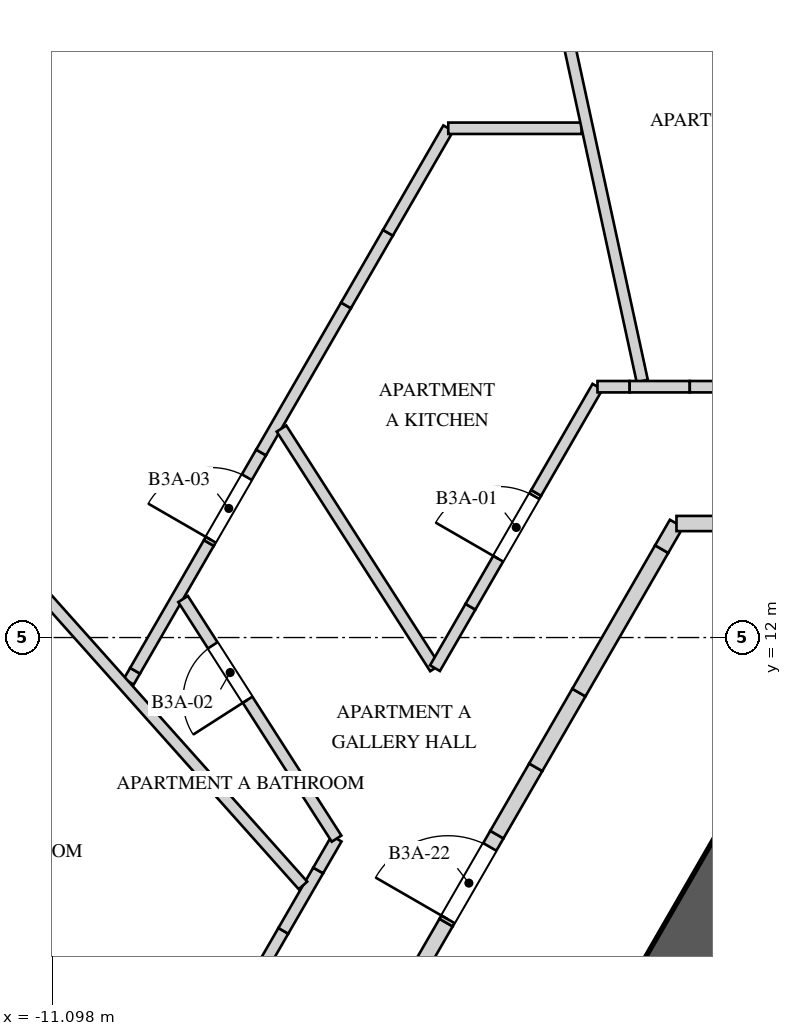
"""IFC4 building model, lengths in metres.
Left out: names, types, materials, properties, quantities, classifications, styles, units other than length and angle.
Written with IfcOpenShell. Run it as: python <this file> out.ifc"""

import sys

from ifc_helpers import new_model, si_unit, direction, frame, frame_2d, origin, place, context, subcontext, project, spatial, polyline, rectangle, outline, extrude, element, fill, save


model = new_model("IFC4")
c1 = context("Model", 3, precision=1e-05, world=origin(), true_north=direction((0.0, 1.0)))
c2 = subcontext(c1, "Body", "Model", "MODEL_VIEW")
j1 = project(units=[si_unit("LENGTHUNIT", "METRE"), si_unit("PLANEANGLEUNIT", "RADIAN")], contexts=[c1])
p1 = place(None, origin())
s1 = spatial("IfcSite", under=j1, at=p1, CompositionType="ELEMENT")
p2 = place(p1, origin())
s2 = spatial("IfcBuilding", under=s1, at=p2, CompositionType="ELEMENT")
p3 = place(p2, frame((0.0, 0.0, 133.6)))
s3 = spatial("IfcBuildingStorey", under=s2, at=p3, CompositionType="ELEMENT", Elevation=133.6)
p4 = place(p3, frame((-1.184, 10.55, 0.0), z_axis=(0.0, 0.0, 1.0), x_axis=(-0.500004814304, -0.866022624227, 0.0)))
e1 = element("IfcWall", 1, at=p4, inside=s3, PredefinedType="SHEAR", context=c2, shape_type="SweptSolid", body=[
    extrude(rectangle(XDim=17.09, YDim=0.9, at=frame_2d((8.545, 0.0))), origin(), (0.0, 0.0, 1.0), 4.0),
])
p5 = place(p4, frame((6.75, 0.0, 0.0)))
e2 = element("IfcOpeningElement", 2, at=p5, cuts=e1, PredefinedType="OPENING", context=c2, shape_type="SweptSolid", body=[
    extrude(rectangle(XDim=1.0, YDim=2.4, at=frame_2d((0.5, 1.2))), frame((0.0, 0.46, 0.0), z_axis=(0.0, -1.0, 0.0), x_axis=(1.0, 0.0, 0.0)), (0.0, 0.0, 1.0), 0.92),
])
p6 = place(p4, frame((14.678, 0.0, 0.0)))
e3 = element("IfcOpeningElement", 3, at=p6, cuts=e1, PredefinedType="OPENING", context=c2, shape_type="SweptSolid", body=[
    extrude(rectangle(XDim=0.8, YDim=2.1, at=frame_2d((0.4, 1.05))), frame((0.0, 0.46, 0.0), z_axis=(0.0, -1.0, 0.0), x_axis=(1.0, 0.0, 0.0)), (0.0, 0.0, 1.0), 0.92),
])
p7 = place(p3, frame((1.597, 19.024, 0.0), z_axis=(0.0, 0.0, 1.0), x_axis=(-0.838677021821, 0.54462909679, 0.0)))
e4 = element("IfcWall", 4, at=p7, inside=s3, PredefinedType="SOLIDWALL", context=c2, shape_type="SweptSolid", body=[
    extrude(rectangle(XDim=7.072, YDim=0.45, at=frame_2d((3.536, 0.0))), origin(), (0.0, 0.0, 1.0), 3.3),
])
p8 = place(p7, frame((0.195, 0.0, 0.5)))
e5 = element("IfcOpeningElement", 5, at=p8, cuts=e4, PredefinedType="OPENING", context=c2, shape_type="SweptSolid", body=[
    extrude(rectangle(XDim=1.75, YDim=2.65, at=frame_2d((0.875, 1.325))), frame((0.0, 0.235, 0.0), z_axis=(0.0, -1.0, 0.0), x_axis=(1.0, 0.0, 0.0)), (0.0, 0.0, 1.0), 0.47),
])
p9 = place(p7, frame((2.661, 0.0, 0.5)))
e6 = element("IfcOpeningElement", 6, at=p9, cuts=e4, PredefinedType="OPENING", context=c2, shape_type="SweptSolid", body=[
    extrude(rectangle(XDim=1.75, YDim=2.65, at=frame_2d((0.875, 1.325))), frame((0.0, 0.235, 0.0), z_axis=(0.0, -1.0, 0.0), x_axis=(1.0, 0.0, 0.0)), (0.0, 0.0, 1.0), 0.47),
])
p10 = place(p7, frame((5.126, 0.0, 0.5)))
e7 = element("IfcOpeningElement", 7, at=p10, cuts=e4, PredefinedType="OPENING", context=c2, shape_type="SweptSolid", body=[
    extrude(rectangle(XDim=1.75, YDim=2.0, at=frame_2d((0.875, 1.0))), frame((0.0, 0.235, 0.0), z_axis=(0.0, -1.0, 0.0), x_axis=(1.0, 0.0, 0.0)), (0.0, 0.0, 1.0), 0.47),
])
p11 = place(p3, frame((-0.766, 9.772, 0.0), z_axis=(0.0, 0.0, 1.0), x_axis=(-0.500009909098, -0.866019682689, 0.0)))
e8 = element("IfcWall", 8, at=p11, inside=s3, PredefinedType="SOLIDWALL", context=c2, shape_type="SweptSolid", body=[
    extrude(rectangle(XDim=6.2, YDim=0.4, at=frame_2d((3.1, 0.0))), origin(), (0.0, 0.0, 1.0), 3.65),
])
p12 = place(p3, frame((-9.458, 5.719, 0.0), z_axis=(0.0, 0.0, 1.0), x_axis=(0.499996941814, 0.866027169422, 0.0)))
e9 = element("IfcWall", 9, at=p12, inside=s3, PredefinedType="PARTITIONING", context=c2, shape_type="SweptSolid", body=[
    extrude(rectangle(XDim=2.797, YDim=0.15, at=frame_2d((1.399, 0.0))), origin(), (0.0, 0.0, 1.0), 3.65),
])
p13 = place(p12, frame((1.1, 0.0, 0.0)))
e10 = element("IfcOpeningElement", 10, at=p13, cuts=e9, PredefinedType="OPENING", context=c2, shape_type="SweptSolid", body=[
    extrude(rectangle(XDim=0.95, YDim=2.4, at=frame_2d((0.475, 1.2))), frame((0.0, 0.085, 0.0), z_axis=(0.0, -1.0, 0.0), x_axis=(1.0, 0.0, 0.0)), (0.0, 0.0, 1.0), 0.17),
])
p14 = place(p3, frame((-8.059, 8.141, 0.0), z_axis=(0.0, 0.0, 1.0), x_axis=(0.500060322201, 0.865990573944, 0.0)))
e11 = element("IfcWall", 11, at=p14, inside=s3, PredefinedType="PARTITIONING", context=c2, shape_type="SweptSolid", body=[
    extrude(rectangle(XDim=0.917, YDim=0.15, at=frame_2d((0.459, 0.0))), origin(), (0.0, 0.0, 1.0), 2.55),
])
p15 = place(p3, frame((-7.6, 8.936, 0.0), z_axis=(0.0, 0.0, 1.0), x_axis=(0.499941024108, 0.866059450854, 0.0)))
e12 = element("IfcWall", 12, at=p15, inside=s3, PredefinedType="PARTITIONING", context=c2, shape_type="SweptSolid", body=[
    extrude(rectangle(XDim=0.483, YDim=0.15, at=frame_2d((0.242, 0.0))), origin(), (0.0, 0.0, 1.0), 3.65),
])
p16 = place(p3, frame((-10.093, 11.419, 0.0), z_axis=(0.0, 0.0, 1.0), x_axis=(0.500399834964, 0.865794435861, 0.0)))
e13 = element("IfcWall", 13, at=p16, inside=s3, PredefinedType="PARTITIONING", context=c2, shape_type="SweptSolid", body=[
    extrude(rectangle(XDim=0.166, YDim=0.15, at=frame_2d((0.083, 0.0))), origin(), (0.0, 0.0, 1.0), 2.55),
])
p17 = place(p3, frame((-10.01, 11.563, 0.0), z_axis=(0.0, 0.0, 1.0), x_axis=(0.499994660107, 0.866028486751, 0.0)))
e14 = element("IfcWall", 14, at=p17, inside=s3, PredefinedType="PARTITIONING", context=c2, shape_type="SweptSolid", body=[
    extrude(rectangle(XDim=1.941, YDim=0.15, at=frame_2d((0.97, 0.0))), origin(), (0.0, 0.0, 1.0), 3.65),
])
p18 = place(p3, frame((-9.039, 13.244, 0.0), z_axis=(0.0, 0.0, 1.0), x_axis=(0.499978698016, 0.866037702141, 0.0)))
e15 = element("IfcWall", 15, at=p18, inside=s3, PredefinedType="PARTITIONING", context=c2, shape_type="SweptSolid", body=[
    extrude(outline(polyline([(0.0, 0.0), (1.375, 0.0), (1.375, 2.55), (0.38, 2.55), (0.38, 3.65), (0.0, 3.65), (0.0, 0.0)])), frame((0.0, 0.075, 0.0), z_axis=(0.0, -1.0, 0.0), x_axis=(1.0, 0.0, 0.0)), (0.0, 0.0, 1.0), 0.15),
])
p19 = place(p18, frame((0.05, 0.0, 0.0)))
e16 = element("IfcOpeningElement", 16, at=p19, cuts=e15, PredefinedType="OPENING", context=c2, shape_type="SweptSolid", body=[
    extrude(rectangle(XDim=0.95, YDim=2.4, at=frame_2d((0.475, 1.2))), frame((0.0, 0.085, 0.0), z_axis=(0.0, -1.0, 0.0), x_axis=(1.0, 0.0, 0.0)), (0.0, 0.0, 1.0), 0.17),
])
p20 = place(p3, frame((-8.352, 14.434, 0.0), z_axis=(0.0, 0.0, 1.0), x_axis=(0.500040905051, 0.866001785954, 0.0)))
e17 = element("IfcWall", 17, at=p20, inside=s3, PredefinedType="PARTITIONING", context=c2, shape_type="SweptSolid", body=[
    extrude(rectangle(XDim=2.234, YDim=0.15, at=frame_2d((1.117, 0.0))), origin(), (0.0, 0.0, 1.0), 3.65),
])
p21 = place(p3, frame((-7.235, 16.369, 0.0), z_axis=(0.0, 0.0, 1.0), x_axis=(0.499850094852, 0.866111934265, 0.0)))
e18 = element("IfcWall", 18, at=p21, inside=s3, PredefinedType="PARTITIONING", context=c2, shape_type="SweptSolid", body=[
    extrude(rectangle(XDim=1.104, YDim=0.15, at=frame_2d((0.552, 0.0))), origin(), (0.0, 0.0, 1.0), 2.55),
])
p22 = place(p3, frame((-6.683, 17.325, 0.0), z_axis=(0.0, 0.0, 1.0), x_axis=(0.500108487576, 0.865962759392, 0.0)))
e19 = element("IfcWall", 19, at=p22, inside=s3, PredefinedType="PARTITIONING", context=c2, shape_type="SweptSolid", body=[
    extrude(rectangle(XDim=1.588, YDim=0.15, at=frame_2d((0.794, 0.0))), origin(), (0.0, 0.0, 1.0), 3.65),
])
p23 = place(p3, frame((-9.658, 5.522, 0.0), z_axis=(0.0, 0.0, 1.0), x_axis=(-0.868078092768, 0.496427663267, 0.0)))
e20 = element("IfcWall", 20, at=p23, inside=s3, PredefinedType="PARTITIONING", context=c2, shape_type="SweptSolid", body=[
    extrude(rectangle(XDim=7.467, YDim=0.15, at=frame_2d((3.733, 0.0))), origin(), (0.0, 0.0, 1.0), 2.75),
])
p24 = place(p3, frame((-8.083, 14.749, 0.0), z_axis=(0.0, 0.0, 1.0), x_axis=(0.539468172068, -0.842005992452, 0.0)))
e21 = element("IfcWall", 21, at=p24, inside=s3, PredefinedType="PARTITIONING", context=c2, shape_type="SweptSolid", body=[
    extrude(rectangle(XDim=3.744, YDim=0.15, at=frame_2d((1.872, 0.0))), origin(), (0.0, 0.0, 1.0), 3.65),
])
p25 = place(p3, frame((-7.801, 8.739, 0.0), z_axis=(0.0, 0.0, 1.0), x_axis=(-0.665934790779, 0.746009955986, 0.0)))
e22 = element("IfcWall", 22, at=p25, inside=s3, PredefinedType="PARTITIONING", context=c2, shape_type="SweptSolid", body=[
    extrude(rectangle(XDim=11.863, YDim=0.15, at=frame_2d((5.932, 0.0))), origin(), (0.0, 0.0, 1.0), 2.55),
])
p26 = place(p3, frame((-7.359, 9.354, 0.0), z_axis=(0.0, 0.0, 1.0), x_axis=(-0.539468172068, 0.842005992452, 0.0)))
e23 = element("IfcWall", 23, at=p26, inside=s3, PredefinedType="PARTITIONING", context=c2, shape_type="SweptSolid", body=[
    extrude(rectangle(XDim=3.744, YDim=0.15, at=frame_2d((1.872, 0.0))), origin(), (0.0, 0.0, 1.0), 3.65),
])
p27 = place(p26, frame((2.17, 0.0, 0.0)))
e24 = element("IfcOpeningElement", 24, at=p27, cuts=e23, PredefinedType="OPENING", context=c2, shape_type="SweptSolid", body=[
    extrude(rectangle(XDim=0.85, YDim=2.4, at=frame_2d((0.425, 1.2))), frame((0.0, 0.085, 0.0), z_axis=(0.0, -1.0, 0.0), x_axis=(1.0, 0.0, 0.0)), (0.0, 0.0, 1.0), 0.17),
])
p28 = place(p3, frame((-6.064, 11.597, 0.0), z_axis=(0.0, 0.0, 1.0), x_axis=(0.499797962495, 0.866142018774, 0.0)))
e25 = element("IfcWall", 25, at=p28, inside=s3, PredefinedType="PARTITIONING", context=c2, shape_type="SweptSolid", body=[
    extrude(rectangle(XDim=0.933, YDim=0.15, at=frame_2d((0.467, 0.0))), origin(), (0.0, 0.0, 1.0), 3.65),
])
p29 = place(p3, frame((-5.597, 12.405, 0.0), z_axis=(0.0, 0.0, 1.0), x_axis=(0.500040090343, 0.866002256377, 0.0)))
e26 = element("IfcWall", 26, at=p29, inside=s3, PredefinedType="PARTITIONING", context=c2, shape_type="SweptSolid", body=[
    extrude(outline(polyline([(0.0, 0.0), (1.73, 0.0), (1.73, 3.65), (1.104, 3.65), (1.104, 2.55), (0.0, 2.55), (0.0, 0.0)])), frame((0.0, 0.075, 0.0), z_axis=(0.0, -1.0, 0.0), x_axis=(1.0, 0.0, 0.0)), (0.0, 0.0, 1.0), 0.15),
])
p30 = place(p29, frame((0.73, 0.0, 0.0)))
e27 = element("IfcOpeningElement", 27, at=p30, cuts=e26, PredefinedType="OPENING", context=c2, shape_type="SweptSolid", body=[
    extrude(rectangle(XDim=0.95, YDim=2.4, at=frame_2d((0.475, 1.2))), frame((0.0, 0.085, 0.0), z_axis=(0.0, -1.0, 0.0), x_axis=(1.0, 0.0, 0.0)), (0.0, 0.0, 1.0), 0.17),
])
p31 = place(p3, frame((-4.732, 13.903, 0.0), z_axis=(0.0, 0.0, 1.0), x_axis=(0.499997628298, 0.866026773083, 0.0)))
e28 = element("IfcWall", 28, at=p31, inside=s3, PredefinedType="PARTITIONING", context=c2, shape_type="SweptSolid", body=[
    extrude(rectangle(XDim=1.613, YDim=0.15, at=frame_2d((0.806, 0.0))), origin(), (0.0, 0.0, 1.0), 3.65),
])
p32 = place(p3, frame((-5.889, 18.7, 0.0), z_axis=(0.0, 0.0, 1.0), x_axis=(1.0, 0.0, 0.0)))
e29 = element("IfcWall", 29, at=p32, inside=s3, PredefinedType="PARTITIONING", context=c2, shape_type="SweptSolid", body=[
    extrude(rectangle(XDim=1.753, YDim=0.15, at=frame_2d((0.877, 0.0))), origin(), (0.0, 0.0, 1.0), 3.65),
])
p33 = place(p3, frame((-5.001, 23.041, 0.0), z_axis=(0.0, 0.0, 1.0), x_axis=(0.212100148987, -0.977247935173, 0.0)))
e30 = element("IfcWall", 30, at=p33, inside=s3, PredefinedType="PARTITIONING", context=c2, shape_type="SweptSolid", body=[
    extrude(rectangle(XDim=7.844, YDim=0.15, at=frame_2d((3.922, 0.0))), origin(), (0.0, 0.0, 1.0), 2.75),
])
p34 = place(p3, frame((-3.926, 15.3, 0.0), z_axis=(0.0, 0.0, 1.0), x_axis=(1.0, 0.0, 0.0)))
e31 = element("IfcWall", 31, at=p34, inside=s3, PredefinedType="PARTITIONING", context=c2, shape_type="SweptSolid", body=[
    extrude(rectangle(XDim=0.423, YDim=0.15, at=frame_2d((0.212, 0.0))), origin(), (0.0, 0.0, 1.0), 3.65),
])
p35 = place(p3, frame((-3.503, 15.3, 0.0), z_axis=(0.0, 0.0, 1.0), x_axis=(1.0, 0.0, 0.0)))
e32 = element("IfcWall", 32, at=p35, inside=s3, PredefinedType="PARTITIONING", context=c2, shape_type="SweptSolid", body=[
    extrude(rectangle(XDim=0.791, YDim=0.15, at=frame_2d((0.396, 0.0))), origin(), (0.0, 0.0, 1.0), 2.75),
])
p36 = place(p3, frame((-2.712, 15.3, 0.0), z_axis=(0.0, 0.0, 1.0), x_axis=(1.0, 0.0, 0.0)))
e33 = element("IfcWall", 33, at=p36, inside=s3, PredefinedType="PARTITIONING", context=c2, shape_type="SweptSolid", body=[
    extrude(rectangle(XDim=4.209, YDim=0.15, at=frame_2d((2.105, 0.0))), origin(), (0.0, 0.0, 1.0), 3.65),
])
p37 = place(p36, frame((2.518, 0.0, 0.0)))
e34 = element("IfcOpeningElement", 34, at=p37, cuts=e33, PredefinedType="OPENING", context=c2, shape_type="SweptSolid", body=[
    extrude(rectangle(XDim=0.95, YDim=2.4, at=frame_2d((0.475, 1.2))), frame((0.0, 0.085, 0.0), z_axis=(0.0, -1.0, 0.0), x_axis=(1.0, 0.0, 0.0)), (0.0, 0.0, 1.0), 0.17),
])
p38 = place(p3, frame((-6.318, 7.556, 0.0), z_axis=(0.0, 0.0, 1.0), x_axis=(0.499942357345, 0.866058681229, 0.0)))
e35 = element("IfcWall", 35, at=p38, inside=s3, PredefinedType="SOLIDWALL", context=c2, shape_type="SweptSolid", body=[
    extrude(rectangle(XDim=0.801, YDim=0.2, at=frame_2d((0.4, 0.0))), origin(), (0.0, 0.0, 1.0), 3.65),
])
p39 = place(p3, frame((-5.918, 8.25, 0.0), z_axis=(0.0, 0.0, 1.0), x_axis=(0.500028081597, 0.86600919026, 0.0)))
e36 = element("IfcWall", 36, at=p39, inside=s3, PredefinedType="SOLIDWALL", context=c2, shape_type="SweptSolid", body=[
    extrude(outline(polyline([(0.0, 0.0), (1.337, 0.0), (1.337, 2.55), (0.313, 2.55), (0.313, 3.65), (0.0, 3.65), (0.0, 0.0)])), frame((0.0, 0.1, 0.0), z_axis=(0.0, -1.0, 0.0), x_axis=(1.0, 0.0, 0.0)), (0.0, 0.0, 1.0), 0.2),
])
p40 = place(p39, frame((0.05, 0.0, 0.0)))
e37 = element("IfcOpeningElement", 37, at=p40, cuts=e36, PredefinedType="OPENING", context=c2, shape_type="SweptSolid", body=[
    extrude(rectangle(XDim=1.1, YDim=2.4, at=frame_2d((0.55, 1.2))), frame((0.0, 0.11, 0.0), z_axis=(0.0, -1.0, 0.0), x_axis=(1.0, 0.0, 0.0)), (0.0, 0.0, 1.0), 0.22),
])
p41 = place(p3, frame((-5.25, 9.407, 0.0), z_axis=(0.0, 0.0, 1.0), x_axis=(0.499991148707, 0.866030514021, 0.0)))
e38 = element("IfcWall", 38, at=p41, inside=s3, PredefinedType="SOLIDWALL", context=c2, shape_type="SweptSolid", body=[
    extrude(rectangle(XDim=1.022, YDim=0.2, at=frame_2d((0.511, 0.0))), origin(), (0.0, 0.0, 1.0), 3.65),
])
p42 = place(p3, frame((-4.738, 10.293, 0.0), z_axis=(0.0, 0.0, 1.0), x_axis=(0.500001688065, 0.866024429177, 0.0)))
e39 = element("IfcWall", 39, at=p42, inside=s3, PredefinedType="SOLIDWALL", context=c2, shape_type="SweptSolid", body=[
    extrude(rectangle(XDim=1.135, YDim=0.2, at=frame_2d((0.568, 0.0))), origin(), (0.0, 0.0, 1.0), 2.55),
])
p43 = place(p3, frame((-4.171, 11.276, 0.0), z_axis=(0.0, 0.0, 1.0), x_axis=(0.50001992892, 0.866013897511, 0.0)))
e40 = element("IfcWall", 40, at=p43, inside=s3, PredefinedType="SOLIDWALL", context=c2, shape_type="SweptSolid", body=[
    extrude(rectangle(XDim=2.179, YDim=0.2, at=frame_2d((1.089, 0.0))), origin(), (0.0, 0.0, 1.0), 3.65),
])
p44 = place(p3, frame((-3.081, 13.163, 0.0), z_axis=(0.0, 0.0, 1.0), x_axis=(0.499849133735, 0.866112488944, 0.0)))
e41 = element("IfcWall", 41, at=p44, inside=s3, PredefinedType="SOLIDWALL", context=c2, shape_type="SweptSolid", body=[
    extrude(rectangle(XDim=0.389, YDim=0.2, at=frame_2d((0.195, 0.0))), origin(), (0.0, 0.0, 1.0), 2.75),
])
p45 = place(p3, frame((-2.887, 13.5, 0.0), z_axis=(0.0, 0.0, 1.0), x_axis=(1.0, 0.0, 0.0)))
e42 = element("IfcWall", 42, at=p45, inside=s3, PredefinedType="SOLIDWALL", context=c2, shape_type="SweptSolid", body=[
    extrude(rectangle(XDim=0.553, YDim=0.2, at=frame_2d((0.277, 0.0))), origin(), (0.0, 0.0, 1.0), 2.75),
])
p46 = place(p30, origin())
e43 = element("IfcDoor", 43, at=p46, inside=s3, OperationType="SINGLE_SWING_LEFT", PredefinedType="DOOR", context=c2, shape_type="SweptSolid", body=[
    extrude(rectangle(XDim=0.95, YDim=2.4, at=frame_2d((0.475, 1.2))), frame((0.0, 0.025, 0.0), z_axis=(0.0, -1.0, 0.0), x_axis=(1.0, 0.0, 0.0)), (0.0, 0.0, 1.0), 0.05),
])
fill(e27, e43)
p47 = place(p27, origin())
e44 = element("IfcDoor", 44, at=p47, inside=s3, OperationType="SINGLE_SWING_RIGHT", PredefinedType="DOOR", context=c2, shape_type="SweptSolid", body=[
    extrude(rectangle(XDim=0.85, YDim=2.4, at=frame_2d((0.425, 1.2))), frame((0.0, 0.025, 0.0), z_axis=(0.0, -1.0, 0.0), x_axis=(1.0, 0.0, 0.0)), (0.0, 0.0, 1.0), 0.05),
])
fill(e24, e44)
p48 = place(p19, origin())
e45 = element("IfcDoor", 45, at=p48, inside=s3, OperationType="SINGLE_SWING_LEFT", PredefinedType="DOOR", context=c2, shape_type="SweptSolid", body=[
    extrude(rectangle(XDim=0.95, YDim=2.4, at=frame_2d((0.475, 1.2))), frame((0.0, 0.025, 0.0), z_axis=(0.0, -1.0, 0.0), x_axis=(1.0, 0.0, 0.0)), (0.0, 0.0, 1.0), 0.05),
])
fill(e16, e45)
p49 = place(p40, origin())
e46 = element("IfcDoor", 46, at=p49, inside=s3, OperationType="SINGLE_SWING_RIGHT", PredefinedType="DOOR", context=c2, shape_type="SweptSolid", body=[
    extrude(rectangle(XDim=1.1, YDim=2.4, at=frame_2d((0.55, 1.2))), frame((0.0, 0.025, 0.0), z_axis=(0.0, -1.0, 0.0), x_axis=(1.0, 0.0, 0.0)), (0.0, 0.0, 1.0), 0.05),
])
fill(e37, e46)
save(model, sys.argv[1])
